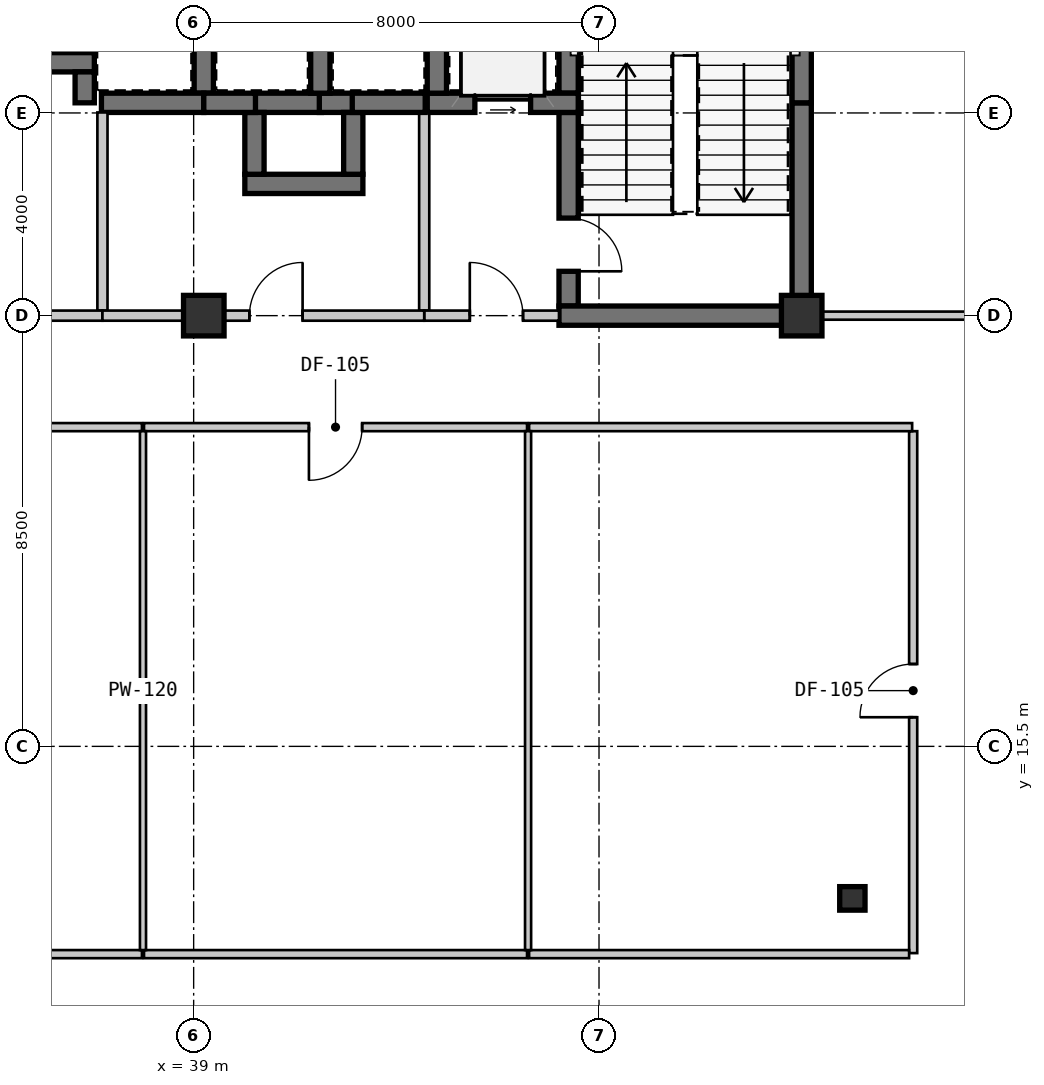
"""IFC4 building model, lengths in metres.
Left out: names, types, materials, properties, quantities, classifications, styles, units other than length and angle.
Written with IfcOpenShell. Run it as: python <this file> out.ifc"""

import sys

from ifc_helpers import new_model, si_unit, direction, frame, frame_2d, origin, origin_2d, place, context, subcontext, project, spatial, rectangle, i_section, extrude, source, transform, mapped, element, fill, save


model = new_model("IFC4")
c1 = context("Model", 3, precision=1e-05, world=origin(), true_north=direction((0.0, 1.0)))
c2 = subcontext(c1, "Body", "Model", "MODEL_VIEW")
j1 = project(units=[si_unit("LENGTHUNIT", "METRE"), si_unit("PLANEANGLEUNIT", "RADIAN")], contexts=[c1])
p1 = place(None, origin())
s1 = spatial("IfcSite", under=j1, at=p1, CompositionType="ELEMENT")
p2 = place(p1, origin())
s2 = spatial("IfcBuilding", under=s1, at=p2, CompositionType="ELEMENT")
p3 = place(p2, frame((0.0, 0.0, 51.45)))
s3 = spatial("IfcBuildingStorey", under=s2, at=p3, CompositionType="ELEMENT", Elevation=51.45)
m1 = source(origin(), c2, "Body", "SweptSolid", [
    extrude(rectangle(XDim=0.8, YDim=0.8, at=origin_2d()), origin(), (0.0, 0.0, 1.0), 3.15),
])
for number, where, z_axis, x_axis in (
    (1, (39.2, 24.0, 0.0), (0.0, 0.0, 1.0), (1.0, 0.0, 0.0)),
    (2, (51.0, 24.0, 0.0), (0.0, 0.0, 1.0), (1.0, 0.0, 0.0)),
):
    element("IfcColumn", number, at=place(p3, frame(where, z_axis=z_axis, x_axis=x_axis)), inside=s3, PredefinedType="COLUMN", context=c2, shape_type="MappedRepresentation", body=[
        mapped(m1, transform((0.0, 0.0, 0.0), scale=1.0)),
    ])
m2 = source(origin(), c2, "Body", "SweptSolid", [
    extrude(i_section(OverallWidth=0.5, OverallDepth=0.464, WebThickness=0.022, FlangeThickness=0.034, at=origin_2d()), origin(), (0.0, 0.0, 1.0), 3.15),
])
p4 = place(p3, frame((52.0, 12.5, 0.0), z_axis=(0.0, 0.0, 1.0), x_axis=(1.0, 0.0, 0.0)))
e3 = element("IfcColumn", 3, at=p4, inside=s3, PredefinedType="COLUMN", context=c2, shape_type="MappedRepresentation", body=[
    mapped(m2, transform((0.0, 0.0, 0.0), scale=1.0)),
])
m3 = source(origin(), c2, "Body", "SweptSolid", [
    extrude(rectangle(XDim=4.01, YDim=0.38, at=frame_2d((2.005, 0.0))), origin(), (0.0, 0.0, 1.0), 2.93),
])
p5 = place(p3, frame((51.0, 24.19, 0.0), z_axis=(0.0, 0.0, 1.0), x_axis=(0.0, 1.0, 0.0)))
e4 = element("IfcWall", 4, at=p5, inside=s3, PredefinedType="SHEAR", context=c2, shape_type="MappedRepresentation", body=[
    mapped(m3, transform((0.0, 0.0, 0.0), scale=1.0)),
])
m4 = source(origin(), c2, "Body", "SweptSolid", [
    extrude(rectangle(XDim=3.61, YDim=0.38, at=frame_2d((1.805, 0.0))), origin(), (0.0, 0.0, 1.0), 2.93),
])
p6 = place(p3, frame((51.0, 28.2, 0.0), z_axis=(0.0, 0.0, 1.0), x_axis=(0.0, 1.0, 0.0)))
e5 = element("IfcWall", 5, at=p6, inside=s3, PredefinedType="SHEAR", context=c2, shape_type="MappedRepresentation", body=[
    mapped(m4, transform((0.0, 0.0, 0.0), scale=1.0)),
])
m5 = source(origin(), c2, "Body", "SweptSolid", [
    extrude(rectangle(XDim=3.42, YDim=0.38, at=frame_2d((1.71, 0.0))), origin(), (0.0, 0.0, 1.0), 2.93),
])
p7 = place(p3, frame((46.4, 31.81, 0.0), z_axis=(0.0, 0.0, 1.0), x_axis=(0.0, -1.0, 0.0)))
e6 = element("IfcWall", 6, at=p7, inside=s3, PredefinedType="SHEAR", context=c2, shape_type="MappedRepresentation", body=[
    mapped(m5, transform((0.0, 0.0, 0.0), scale=1.0)),
])
m6 = source(origin(), c2, "Body", "SweptSolid", [
    extrude(rectangle(XDim=3.82, YDim=0.38, at=frame_2d((1.91, 0.0))), origin(), (0.0, 0.0, 1.0), 2.93),
])
p8 = place(p3, frame((46.4, 28.01, 0.0), z_axis=(0.0, 0.0, 1.0), x_axis=(0.0, -1.0, 0.0)))
e7 = element("IfcWall", 7, at=p8, inside=s3, PredefinedType="SHEAR", context=c2, shape_type="MappedRepresentation", body=[
    mapped(m6, transform((0.0, 0.0, 0.0), scale=1.0)),
])
m7 = source(origin(), c2, "Body", "SweptSolid", [
    extrude(rectangle(XDim=1.05, YDim=2.1, at=frame_2d((0.525, 1.05))), frame((0.0, 0.2, 0.0), z_axis=(0.0, -1.0, 0.0), x_axis=(1.0, 0.0, 0.0)), (0.0, 0.0, 1.0), 0.4),
])
p9 = place(p8, frame((2.085, 0.0, 0.0)))
e8 = element("IfcOpeningElement", 8, at=p9, cuts=e7, PredefinedType="OPENING", context=c2, shape_type="MappedRepresentation", body=[
    mapped(m7, transform((0.0, 0.0, 0.0), scale=1.0)),
])
m8 = source(origin(), c2, "Body", "SweptSolid", [
    extrude(rectangle(XDim=4.98, YDim=0.38, at=frame_2d((2.49, 0.0))), origin(), (0.0, 0.0, 1.0), 2.93),
])
p10 = place(p3, frame((46.21, 24.0, 0.0), z_axis=(0.0, 0.0, 1.0), x_axis=(1.0, 0.0, 0.0)))
e9 = element("IfcWall", 9, at=p10, inside=s3, PredefinedType="SHEAR", context=c2, shape_type="MappedRepresentation", body=[
    mapped(m8, transform((0.0, 0.0, 0.0), scale=1.0)),
])
m9 = source(origin(), c2, "Body", "SweptSolid", [
    extrude(rectangle(XDim=2.98, YDim=0.38, at=frame_2d((1.49, 0.0))), origin(), (0.0, 0.0, 1.0), 2.93),
])
p11 = place(p3, frame((43.61, 28.2, 0.0), z_axis=(0.0, 0.0, 1.0), x_axis=(1.0, 0.0, 0.0)))
e10 = element("IfcWall", 10, at=p11, inside=s3, PredefinedType="SHEAR", context=c2, shape_type="MappedRepresentation", body=[
    mapped(m9, transform((0.0, 0.0, 0.0), scale=1.0)),
])
m10 = source(origin(), c2, "Body", "SweptSolid", [
    extrude(rectangle(XDim=1.1, YDim=2.15, at=frame_2d((0.55, 1.075))), frame((0.0, 0.2, 0.0), z_axis=(0.0, -1.0, 0.0), x_axis=(1.0, 0.0, 0.0)), (0.0, 0.0, 1.0), 0.4),
])
p12 = place(p11, frame((0.94, 0.0, 0.0)))
e11 = element("IfcOpeningElement", 11, at=p12, cuts=e10, PredefinedType="OPENING", context=c2, shape_type="MappedRepresentation", body=[
    mapped(m10, transform((0.0, 0.0, 0.0), scale=1.0)),
])
p13 = place(p3, frame((43.8, 31.81, 0.0), z_axis=(0.0, 0.0, 1.0), x_axis=(0.0, -1.0, 0.0)))
e12 = element("IfcWall", 12, at=p13, inside=s3, PredefinedType="SHEAR", context=c2, shape_type="MappedRepresentation", body=[
    mapped(m5, transform((0.0, 0.0, 0.0), scale=1.0)),
])
m11 = source(origin(), c2, "Body", "SweptSolid", [
    extrude(rectangle(XDim=3.91, YDim=0.2, at=frame_2d((1.955, 0.0))), origin(), (0.0, 0.0, 1.0), 2.93),
])
p14 = place(p3, frame((43.55, 28.01, 0.0), z_axis=(0.0, 0.0, 1.0), x_axis=(0.0, -1.0, 0.0)))
e13 = element("IfcWall", 13, at=p14, inside=s3, PredefinedType="SOLIDWALL", context=c2, shape_type="MappedRepresentation", body=[
    mapped(m11, transform((0.0, 0.0, 0.0), scale=1.0)),
])
m12 = source(origin(), c2, "Body", "SweptSolid", [
    extrude(rectangle(XDim=2.66, YDim=0.2, at=frame_2d((1.33, 0.0))), origin(), (0.0, 0.0, 1.0), 2.397),
])
p15 = place(p3, frame((43.55, 24.0, 0.0), z_axis=(0.0, 0.0, 1.0), x_axis=(1.0, 0.0, 0.0)))
e14 = element("IfcWall", 14, at=p15, inside=s3, PredefinedType="SOLIDWALL", context=c2, shape_type="MappedRepresentation", body=[
    mapped(m12, transform((0.0, 0.0, 0.0), scale=1.0)),
])
m13 = source(origin(), c2, "Body", "SweptSolid", [
    extrude(rectangle(XDim=1.05, YDim=2.1, at=frame_2d((0.525, 1.05))), frame((0.0, 0.11, 0.0), z_axis=(0.0, -1.0, 0.0), x_axis=(1.0, 0.0, 0.0)), (0.0, 0.0, 1.0), 0.22),
])
p16 = place(p15, frame((0.9, 0.0, 0.0)))
e15 = element("IfcOpeningElement", 15, at=p16, cuts=e14, PredefinedType="OPENING", context=c2, shape_type="MappedRepresentation", body=[
    mapped(m13, transform((0.0, 0.0, 0.0), scale=1.0)),
])
m14 = source(origin(), c2, "Body", "SweptSolid", [
    extrude(rectangle(XDim=1.12, YDim=0.38, at=frame_2d((0.56, 0.0))), origin(), (0.0, 0.0, 1.0), 2.93),
])
p17 = place(p3, frame((36.85, 29.19, 0.0), z_axis=(0.0, 0.0, 1.0), x_axis=(0.0, 1.0, 0.0)))
e16 = element("IfcWall", 16, at=p17, inside=s3, PredefinedType="SHEAR", context=c2, shape_type="MappedRepresentation", body=[
    mapped(m14, transform((0.0, 0.0, 0.0), scale=1.0)),
])
m15 = source(origin(), c2, "Body", "SweptSolid", [
    extrude(rectangle(XDim=2.08, YDim=0.38, at=frame_2d((1.04, 0.0))), origin(), (0.0, 0.0, 1.0), 2.93),
])
p18 = place(p3, frame((34.96, 29.0, 0.0), z_axis=(0.0, 0.0, 1.0), x_axis=(1.0, 0.0, 0.0)))
e17 = element("IfcWall", 17, at=p18, inside=s3, PredefinedType="SHEAR", context=c2, shape_type="MappedRepresentation", body=[
    mapped(m15, transform((0.0, 0.0, 0.0), scale=1.0)),
])
m16 = source(origin(), c2, "Body", "SweptSolid", [
    extrude(rectangle(XDim=1.32, YDim=0.38, at=frame_2d((0.66, 0.0))), origin(), (0.0, 0.0, 1.0), 2.93),
])
p19 = place(p3, frame((41.52, 28.2, 0.0), z_axis=(0.0, 0.0, 1.0), x_axis=(-1.0, 0.0, 0.0)))
e18 = element("IfcWall", 18, at=p19, inside=s3, PredefinedType="SHEAR", context=c2, shape_type="MappedRepresentation", body=[
    mapped(m16, transform((0.0, 0.0, 0.0), scale=1.0)),
])
m17 = source(origin(), c2, "Body", "SweptSolid", [
    extrude(rectangle(XDim=0.67, YDim=0.38, at=frame_2d((0.335, 0.0))), origin(), (0.0, 0.0, 1.0), 2.93),
])
p20 = place(p3, frame((42.15, 28.2, 0.0), z_axis=(0.0, 0.0, 1.0), x_axis=(-1.0, 0.0, 0.0)))
e19 = element("IfcWall", 19, at=p20, inside=s3, PredefinedType="SHEAR", context=c2, shape_type="MappedRepresentation", body=[
    mapped(m17, transform((0.0, 0.0, 0.0), scale=1.0)),
])
m18 = source(origin(), c2, "Body", "SweptSolid", [
    extrude(rectangle(XDim=2.33, YDim=0.38, at=frame_2d((1.165, 0.0))), origin(), (0.0, 0.0, 1.0), 2.93),
])
p21 = place(p3, frame((40.01, 26.6, 0.0), z_axis=(0.0, 0.0, 1.0), x_axis=(1.0, 0.0, 0.0)))
e20 = element("IfcWall", 20, at=p21, inside=s3, PredefinedType="SHEAR", context=c2, shape_type="MappedRepresentation", body=[
    mapped(m18, transform((0.0, 0.0, 0.0), scale=1.0)),
])
m19 = source(origin(), c2, "Body", "SweptSolid", [
    extrude(rectangle(XDim=1.22, YDim=0.38, at=frame_2d((0.61, 0.0))), origin(), (0.0, 0.0, 1.0), 2.93),
])
for number, where, z_axis, x_axis in (
    (21, (40.2, 28.01, 0.0), (0.0, 0.0, 1.0), (0.0, -1.0, 0.0)),
    (22, (42.15, 26.79, 0.0), (0.0, 0.0, 1.0), (0.0, 1.0, 0.0)),
):
    element("IfcWall", number, at=place(p3, frame(where, z_axis=z_axis, x_axis=x_axis)), inside=s3, PredefinedType="SHEAR", context=c2, shape_type="MappedRepresentation", body=[
        mapped(m19, transform((0.0, 0.0, 0.0), scale=1.0)),
    ])
p22 = place(p3, frame((39.2, 28.39, 0.0), z_axis=(0.0, 0.0, 1.0), x_axis=(0.0, 1.0, 0.0)))
e23 = element("IfcWall", 23, at=p22, inside=s3, PredefinedType="SHEAR", context=c2, shape_type="MappedRepresentation", body=[
    mapped(m5, transform((0.0, 0.0, 0.0), scale=1.0)),
])
m20 = source(origin(), c2, "Body", "SweptSolid", [
    extrude(rectangle(XDim=0.61, YDim=0.38, at=frame_2d((0.305, 0.0))), origin(), (0.0, 0.0, 1.0), 2.93),
])
p23 = place(p3, frame((36.85, 28.81, 0.0), z_axis=(0.0, 0.0, 1.0), x_axis=(0.0, -1.0, 0.0)))
e24 = element("IfcWall", 24, at=p23, inside=s3, PredefinedType="SHEAR", context=c2, shape_type="MappedRepresentation", body=[
    mapped(m20, transform((0.0, 0.0, 0.0), scale=1.0)),
])
m21 = source(origin(), c2, "Body", "SweptSolid", [
    extrude(rectangle(XDim=2.02, YDim=0.38, at=frame_2d((1.01, 0.0))), origin(), (0.0, 0.0, 1.0), 2.93),
])
p24 = place(p3, frame((37.18, 28.2, 0.0), z_axis=(0.0, 0.0, 1.0), x_axis=(1.0, 0.0, 0.0)))
e25 = element("IfcWall", 25, at=p24, inside=s3, PredefinedType="SHEAR", context=c2, shape_type="MappedRepresentation", body=[
    mapped(m21, transform((0.0, 0.0, 0.0), scale=1.0)),
])
p25 = place(p3, frame((41.5, 28.39, 0.0), z_axis=(0.0, 0.0, 1.0), x_axis=(0.0, 1.0, 0.0)))
e26 = element("IfcWall", 26, at=p25, inside=s3, PredefinedType="SHEAR", context=c2, shape_type="MappedRepresentation", body=[
    mapped(m5, transform((0.0, 0.0, 0.0), scale=1.0)),
])
m22 = source(origin(), c2, "Body", "SweptSolid", [
    extrude(rectangle(XDim=1.02, YDim=0.38, at=frame_2d((0.51, 0.0))), origin(), (0.0, 0.0, 1.0), 2.93),
])
p26 = place(p3, frame((39.2, 28.2, 0.0), z_axis=(0.0, 0.0, 1.0), x_axis=(1.0, 0.0, 0.0)))
e27 = element("IfcWall", 27, at=p26, inside=s3, PredefinedType="SHEAR", context=c2, shape_type="MappedRepresentation", body=[
    mapped(m22, transform((0.0, 0.0, 0.0), scale=1.0)),
])
m23 = source(origin(), c2, "Body", "SweptSolid", [
    extrude(rectangle(XDim=1.44, YDim=0.38, at=frame_2d((0.72, 0.0))), origin(), (0.0, 0.0, 1.0), 2.93),
])
p27 = place(p3, frame((42.13, 28.2, 0.0), z_axis=(0.0, 0.0, 1.0), x_axis=(1.0, 0.0, 0.0)))
e28 = element("IfcWall", 28, at=p27, inside=s3, PredefinedType="SHEAR", context=c2, shape_type="MappedRepresentation", body=[
    mapped(m23, transform((0.0, 0.0, 0.0), scale=1.0)),
])
p28 = place(p3, frame((37.2, 28.01, 0.0), z_axis=(0.0, 0.0, 1.0), x_axis=(0.0, -1.0, 0.0)))
e29 = element("IfcWall", 29, at=p28, inside=s3, PredefinedType="SOLIDWALL", context=c2, shape_type="MappedRepresentation", body=[
    mapped(m11, transform((0.0, 0.0, 0.0), scale=1.0)),
])
m24 = source(origin(), c2, "Body", "SweptSolid", [
    extrude(rectangle(XDim=6.4, YDim=0.2, at=frame_2d((3.2, 0.0))), origin(), (0.0, 0.0, 1.0), 2.47),
])
p29 = place(p3, frame((37.2, 24.0, 0.0), z_axis=(0.0, 0.0, 1.0), x_axis=(-1.0, 0.0, 0.0)))
e30 = element("IfcWall", 30, at=p29, inside=s3, PredefinedType="SOLIDWALL", context=c2, shape_type="MappedRepresentation", body=[
    mapped(m24, transform((0.0, 0.0, 0.0), scale=1.0)),
])
p30 = place(p29, frame((2.675, 0.0, 0.0)))
e31 = element("IfcOpeningElement", 31, at=p30, cuts=e30, PredefinedType="OPENING", context=c2, shape_type="MappedRepresentation", body=[
    mapped(m13, transform((0.0, 0.0, 0.0), scale=1.0)),
])
m25 = source(origin(), c2, "Body", "SweptSolid", [
    extrude(rectangle(XDim=4.35, YDim=0.2, at=frame_2d((2.175, 0.0))), origin(), (0.0, 0.0, 1.0), 2.397),
])
p31 = place(p3, frame((43.55, 24.0, 0.0), z_axis=(0.0, 0.0, 1.0), x_axis=(-1.0, 0.0, 0.0)))
e32 = element("IfcWall", 32, at=p31, inside=s3, PredefinedType="SOLIDWALL", context=c2, shape_type="MappedRepresentation", body=[
    mapped(m25, transform((0.0, 0.0, 0.0), scale=1.0)),
])
p32 = place(p31, frame((2.4, 0.0, 0.0)))
e33 = element("IfcOpeningElement", 33, at=p32, cuts=e32, PredefinedType="OPENING", context=c2, shape_type="MappedRepresentation", body=[
    mapped(m13, transform((0.0, 0.0, 0.0), scale=1.0)),
])
m26 = source(origin(), c2, "Body", "SweptSolid", [
    extrude(rectangle(XDim=2.0, YDim=0.2, at=frame_2d((1.0, 0.0))), origin(), (0.0, 0.0, 1.0), 2.47),
])
p33 = place(p3, frame((39.2, 24.0, 0.0), z_axis=(0.0, 0.0, 1.0), x_axis=(-1.0, 0.0, 0.0)))
e34 = element("IfcWall", 34, at=p33, inside=s3, PredefinedType="SOLIDWALL", context=c2, shape_type="MappedRepresentation", body=[
    mapped(m26, transform((0.0, 0.0, 0.0), scale=1.0)),
])
m27 = source(origin(), c2, "Body", "SweptSolid", [
    extrude(rectangle(XDim=21.159, YDim=0.16, at=frame_2d((10.58, 0.0))), origin(), (0.0, 0.0, 1.0), 2.93),
])
p34 = place(p3, frame((37.98, 21.8, 0.0), z_axis=(0.0, 0.0, 1.0), x_axis=(-1.0, 0.0, 0.0)))
e35 = element("IfcWall", 35, at=p34, inside=s3, PredefinedType="PARTITIONING", context=c2, shape_type="MappedRepresentation", body=[
    mapped(m27, transform((0.0, 0.0, 0.0), scale=1.0)),
])
m28 = source(origin(), c2, "Body", "SweptSolid", [
    extrude(rectangle(XDim=0.92, YDim=2.1, at=frame_2d((0.46, 1.05))), frame((0.0, 0.09, 0.0), z_axis=(0.0, -1.0, 0.0), x_axis=(1.0, 0.0, 0.0)), (0.0, 0.0, 1.0), 0.18),
])
p35 = place(p34, frame((10.12, 0.0, 0.0)))
e36 = element("IfcOpeningElement", 36, at=p35, cuts=e35, PredefinedType="OPENING", context=c2, shape_type="MappedRepresentation", body=[
    mapped(m28, transform((0.0, 0.0, 0.0), scale=1.0)),
])
m29 = source(origin(), c2, "Body", "SweptSolid", [
    extrude(rectangle(XDim=7.56, YDim=0.16, at=frame_2d((3.78, 0.0))), origin(), (0.0, 0.0, 1.0), 2.93),
])
p36 = place(p3, frame((45.58, 21.8, 0.0), z_axis=(0.0, 0.0, 1.0), x_axis=(-1.0, 0.0, 0.0)))
e37 = element("IfcWall", 37, at=p36, inside=s3, PredefinedType="PARTITIONING", context=c2, shape_type="MappedRepresentation", body=[
    mapped(m29, transform((0.0, 0.0, 0.0), scale=1.0)),
])
m30 = source(origin(), c2, "Body", "SweptSolid", [
    extrude(rectangle(XDim=1.05, YDim=2.1, at=frame_2d((0.525, 1.05))), frame((0.0, 0.09, 0.0), z_axis=(0.0, -1.0, 0.0), x_axis=(1.0, 0.0, 0.0)), (0.0, 0.0, 1.0), 0.18),
])
p37 = place(p36, frame((3.255, 0.0, 0.0)))
e38 = element("IfcOpeningElement", 38, at=p37, cuts=e37, PredefinedType="OPENING", context=c2, shape_type="MappedRepresentation", body=[
    mapped(m30, transform((0.0, 0.0, 0.0), scale=1.0)),
])
m31 = source(origin(), c2, "Body", "SweptSolid", [
    extrude(rectangle(XDim=10.3, YDim=0.16, at=frame_2d((5.15, 0.0))), origin(), (0.0, 0.0, 1.0), 2.93),
])
p38 = place(p3, frame((53.2, 11.42, 0.0), z_axis=(0.0, 0.0, 1.0), x_axis=(0.0, 1.0, 0.0)))
e39 = element("IfcWall", 39, at=p38, inside=s3, PredefinedType="PARTITIONING", context=c2, shape_type="MappedRepresentation", body=[
    mapped(m31, transform((0.0, 0.0, 0.0), scale=1.0)),
])
p39 = place(p38, frame((4.655, 0.0, 0.0)))
e40 = element("IfcOpeningElement", 40, at=p39, cuts=e39, PredefinedType="OPENING", context=c2, shape_type="MappedRepresentation", body=[
    mapped(m30, transform((0.0, 0.0, 0.0), scale=1.0)),
])
p40 = place(p3, frame((53.18, 21.8, 0.0), z_axis=(0.0, 0.0, 1.0), x_axis=(-1.0, 0.0, 0.0)))
e41 = element("IfcWall", 41, at=p40, inside=s3, PredefinedType="PARTITIONING", context=c2, shape_type="MappedRepresentation", body=[
    mapped(m29, transform((0.0, 0.0, 0.0), scale=1.0)),
])
m32 = source(origin(), c2, "Body", "SweptSolid", [
    extrude(rectangle(XDim=4.13, YDim=0.16, at=frame_2d((2.065, 0.0))), origin(), (0.0, 0.0, 1.0), 2.93),
])
p41 = place(p3, frame((51.19, 24.0, 0.0), z_axis=(0.0, 0.0, 1.0), x_axis=(1.0, 0.0, 0.0)))
e42 = element("IfcWall", 42, at=p41, inside=s3, PredefinedType="PARTITIONING", context=c2, shape_type="MappedRepresentation", body=[
    mapped(m32, transform((0.0, 0.0, 0.0), scale=1.0)),
])
m33 = source(origin(), c2, "Body", "SweptSolid", [
    extrude(rectangle(XDim=21.1, YDim=0.16, at=frame_2d((10.55, 0.0))), origin(), (0.0, 0.0, 1.0), 2.93),
])
p42 = place(p3, frame((16.88, 11.4, 0.0), z_axis=(0.0, 0.0, 1.0), x_axis=(1.0, 0.0, 0.0)))
e43 = element("IfcWall", 43, at=p42, inside=s3, PredefinedType="PARTITIONING", context=c2, shape_type="MappedRepresentation", body=[
    mapped(m33, transform((0.0, 0.0, 0.0), scale=1.0)),
])
p43 = place(p3, frame((38.02, 11.4, 0.0), z_axis=(0.0, 0.0, 1.0), x_axis=(1.0, 0.0, 0.0)))
e44 = element("IfcWall", 44, at=p43, inside=s3, PredefinedType="PARTITIONING", context=c2, shape_type="MappedRepresentation", body=[
    mapped(m29, transform((0.0, 0.0, 0.0), scale=1.0)),
])
m34 = source(origin(), c2, "Body", "SweptSolid", [
    extrude(rectangle(XDim=7.5, YDim=0.16, at=frame_2d((3.75, 0.0))), origin(), (0.0, 0.0, 1.0), 2.93),
])
p44 = place(p3, frame((45.62, 11.4, 0.0), z_axis=(0.0, 0.0, 1.0), x_axis=(1.0, 0.0, 0.0)))
e45 = element("IfcWall", 45, at=p44, inside=s3, PredefinedType="PARTITIONING", context=c2, shape_type="MappedRepresentation", body=[
    mapped(m34, transform((0.0, 0.0, 0.0), scale=1.0)),
])
m35 = source(origin(), c2, "Body", "SweptSolid", [
    extrude(rectangle(XDim=10.24, YDim=0.12, at=frame_2d((5.12, 0.0))), origin(), (0.0, 0.0, 1.0), 2.93),
])
for number, where, z_axis, x_axis in (
    (46, (38.0, 21.72, 0.0), (0.0, 0.0, 1.0), (0.0, -1.0, 0.0)),
    (47, (45.6, 21.72, 0.0), (0.0, 0.0, 1.0), (0.0, -1.0, 0.0)),
):
    element("IfcWall", number, at=place(p3, frame(where, z_axis=z_axis, x_axis=x_axis)), inside=s3, PredefinedType="PARTITIONING", context=c2, shape_type="MappedRepresentation", body=[
        mapped(m35, transform((0.0, 0.0, 0.0), scale=1.0)),
    ])
m36 = source(origin(), c2, "Body", "SweptSolid", [
    extrude(rectangle(XDim=1.05, YDim=2.1, at=frame_2d((0.525, 1.05))), frame((0.0, 0.025, 0.0), z_axis=(0.0, -1.0, 0.0), x_axis=(1.0, 0.0, 0.0)), (0.0, 0.0, 1.0), 0.05),
])
p45 = place(p9, origin())
e48 = element("IfcDoor", 48, at=p45, inside=s3, OperationType="SINGLE_SWING_RIGHT", PredefinedType="DOOR", context=c2, shape_type="MappedRepresentation", body=[
    mapped(m36, transform((0.0, 0.0, 0.0), scale=1.0)),
])
fill(e8, e48)
m37 = source(origin(), c2, "Body", "SweptSolid", [
    extrude(rectangle(XDim=1.1, YDim=2.15, at=frame_2d((0.55, 1.075))), frame((0.0, 0.025, 0.0), z_axis=(0.0, -1.0, 0.0), x_axis=(1.0, 0.0, 0.0)), (0.0, 0.0, 1.0), 0.05),
])
p46 = place(p12, origin())
e49 = element("IfcDoor", 49, at=p46, inside=s3, OperationType="SLIDING_TO_LEFT", PredefinedType="DOOR", context=c2, shape_type="MappedRepresentation", body=[
    mapped(m37, transform((0.0, 0.0, 0.0), scale=1.0)),
])
fill(e11, e49)
p47 = place(p16, origin())
e50 = element("IfcDoor", 50, at=p47, inside=s3, OperationType="SINGLE_SWING_LEFT", PredefinedType="DOOR", context=c2, shape_type="MappedRepresentation", body=[
    mapped(m36, transform((0.0, 0.0, 0.0), scale=1.0)),
])
fill(e15, e50)
p48 = place(p32, frame((1.05, 0.0, 0.0), z_axis=(0.0, 0.0, 1.0), x_axis=(-1.0, 0.0, 0.0)))
e51 = element("IfcDoor", 51, at=p48, inside=s3, OperationType="SINGLE_SWING_RIGHT", PredefinedType="DOOR", context=c2, shape_type="MappedRepresentation", body=[
    mapped(m36, transform((0.0, 0.0, 0.0), scale=1.0)),
])
fill(e33, e51)
p49 = place(p37, origin())
e52 = element("IfcDoor", 52, at=p49, inside=s3, OperationType="SINGLE_SWING_RIGHT", PredefinedType="DOOR", context=c2, shape_type="MappedRepresentation", body=[
    mapped(m36, transform((0.0, 0.0, 0.0), scale=1.0)),
])
fill(e38, e52)
p50 = place(p39, origin())
e53 = element("IfcDoor", 53, at=p50, inside=s3, OperationType="SINGLE_SWING_LEFT", PredefinedType="DOOR", context=c2, shape_type="MappedRepresentation", body=[
    mapped(m36, transform((0.0, 0.0, 0.0), scale=1.0)),
])
fill(e40, e53)
save(model, sys.argv[1])
